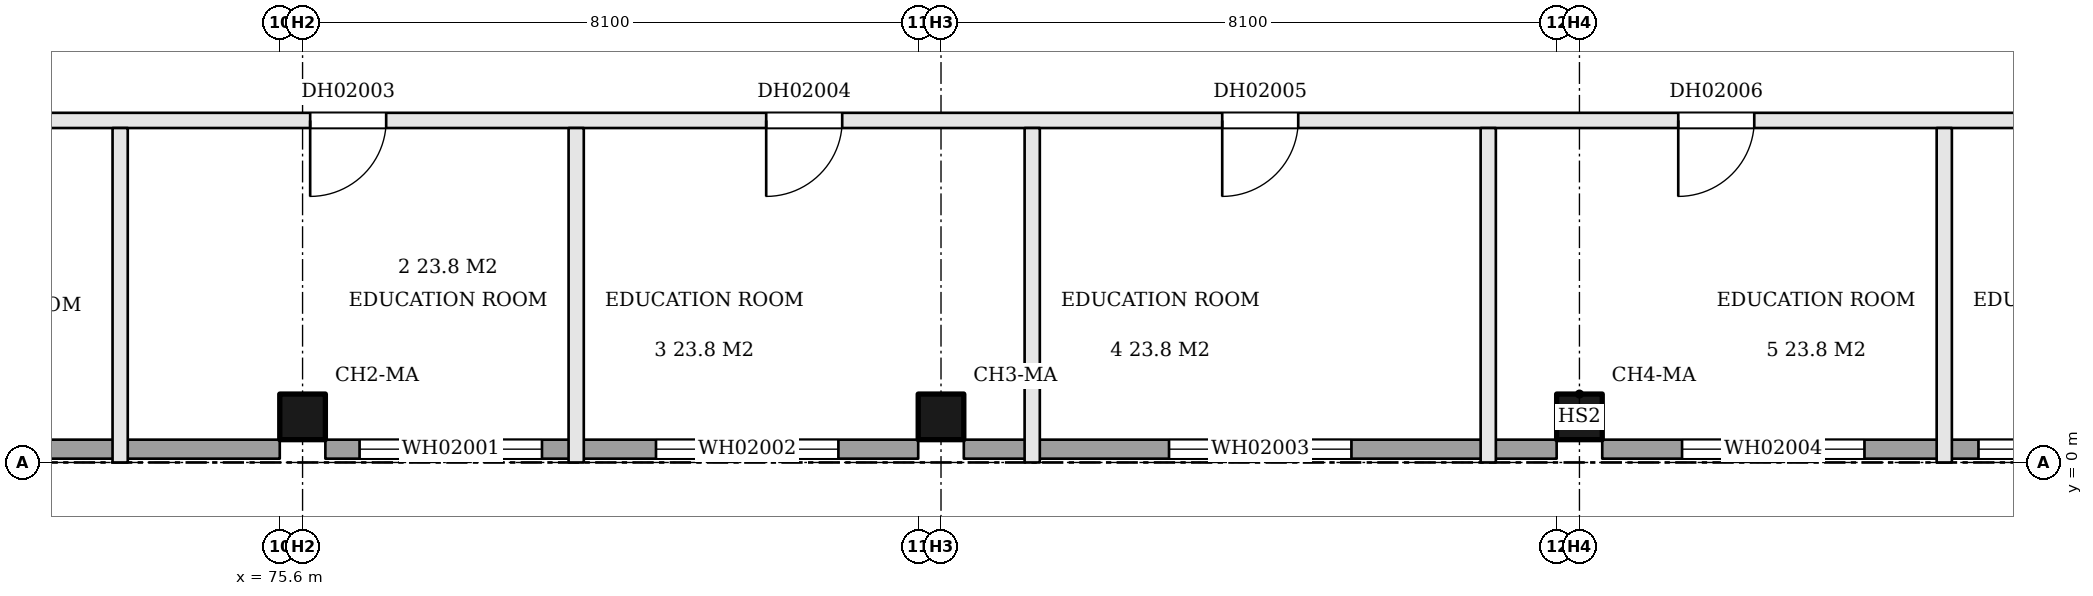
"""IFC4 building model, lengths in metres.
Left out: names, types, materials, properties, quantities, classifications, styles, units other than length and angle.
Written with IfcOpenShell. Run it as: python <this file> out.ifc"""

import sys

from ifc_helpers import new_model, si_unit, direction, frame, frame_2d, origin, origin_2d, place, context, subcontext, project, spatial, rectangle, extrude, element, fill, save


model = new_model("IFC4")
c1 = context("Model", 3, precision=1e-05, world=origin(), true_north=direction((0.0, 1.0)))
c2 = subcontext(c1, "Body", "Model", "MODEL_VIEW")
j1 = project(units=[si_unit("LENGTHUNIT", "METRE"), si_unit("PLANEANGLEUNIT", "RADIAN")], contexts=[c1])
p1 = place(None, origin())
s1 = spatial("IfcSite", under=j1, at=p1, CompositionType="ELEMENT")
p2 = place(p1, origin())
s2 = spatial("IfcBuilding", under=s1, at=p2, CompositionType="ELEMENT")
p3 = place(p2, frame((0.0, 0.0, 14.4)))
s3 = spatial("IfcBuildingStorey", under=s2, at=p3, CompositionType="ELEMENT", Elevation=14.4)
for number, where, z_axis, x_axis in (
    (1, (75.9, 0.6, 0.0), (0.0, 0.0, 1.0), (1.0, 0.0, 0.0)),
    (2, (84.3, 0.6, 0.0), (0.0, 0.0, 1.0), (1.0, 0.0, 0.0)),
    (3, (92.7, 0.6, 0.0), (0.0, 0.0, 1.0), (1.0, 0.0, 0.0)),
):
    element("IfcColumn", number, at=place(p3, frame(where, z_axis=z_axis, x_axis=x_axis)), inside=s3, PredefinedType="COLUMN", context=c2, shape_type="SweptSolid", body=[
        extrude(rectangle(XDim=0.6, YDim=0.6, at=origin_2d()), origin(), (0.0, 0.0, 1.0), 5.1),
    ])
p4 = place(p3, frame((68.4, 0.175, 0.0), z_axis=(0.0, 0.0, 1.0), x_axis=(1.0, 0.0, 0.0)))
e4 = element("IfcWall", 4, at=p4, inside=s3, PredefinedType="SOLIDWALL", context=c2, shape_type="SweptSolid", body=[
    extrude(rectangle(XDim=7.2, YDim=0.25, at=frame_2d((3.6, 0.0))), origin(), (0.0, 0.0, 1.0), 5.1),
])
p5 = place(p3, frame((76.2, 0.175, 0.0), z_axis=(0.0, 0.0, 1.0), x_axis=(1.0, 0.0, 0.0)))
e5 = element("IfcWall", 5, at=p5, inside=s3, PredefinedType="SOLIDWALL", context=c2, shape_type="SweptSolid", body=[
    extrude(rectangle(XDim=7.8, YDim=0.25, at=frame_2d((3.9, 0.0))), origin(), (0.0, 0.0, 1.0), 5.1),
])
p6 = place(p5, frame((0.45, 0.0, 0.9)))
e6 = element("IfcOpeningElement", 6, at=p6, cuts=e5, PredefinedType="OPENING", context=c2, shape_type="SweptSolid", body=[
    extrude(rectangle(XDim=2.4, YDim=1.5, at=frame_2d((1.2, 0.75))), frame((0.0, 0.135, 0.0), z_axis=(0.0, -1.0, 0.0), x_axis=(1.0, 0.0, 0.0)), (0.0, 0.0, 1.0), 0.27),
])
p7 = place(p5, frame((4.35, 0.0, 0.9)))
e7 = element("IfcOpeningElement", 7, at=p7, cuts=e5, PredefinedType="OPENING", context=c2, shape_type="SweptSolid", body=[
    extrude(rectangle(XDim=2.4, YDim=1.5, at=frame_2d((1.2, 0.75))), frame((0.0, 0.135, 0.0), z_axis=(0.0, -1.0, 0.0), x_axis=(1.0, 0.0, 0.0)), (0.0, 0.0, 1.0), 0.27),
])
p8 = place(p3, frame((84.6, 0.175, 0.0), z_axis=(0.0, 0.0, 1.0), x_axis=(1.0, 0.0, 0.0)))
e8 = element("IfcWall", 8, at=p8, inside=s3, PredefinedType="SOLIDWALL", context=c2, shape_type="SweptSolid", body=[
    extrude(rectangle(XDim=7.8, YDim=0.25, at=frame_2d((3.9, 0.0))), origin(), (0.0, 0.0, 1.0), 5.1),
])
p9 = place(p8, frame((2.7, 0.0, 0.9)))
e9 = element("IfcOpeningElement", 9, at=p9, cuts=e8, PredefinedType="OPENING", context=c2, shape_type="SweptSolid", body=[
    extrude(rectangle(XDim=2.4, YDim=1.5, at=frame_2d((1.2, 0.75))), frame((0.0, 0.135, 0.0), z_axis=(0.0, -1.0, 0.0), x_axis=(1.0, 0.0, 0.0)), (0.0, 0.0, 1.0), 0.27),
])
p10 = place(p3, frame((93.0, 0.175, 0.0), z_axis=(0.0, 0.0, 1.0), x_axis=(1.0, 0.0, 0.0)))
e10 = element("IfcWall", 10, at=p10, inside=s3, PredefinedType="SOLIDWALL", context=c2, shape_type="SweptSolid", body=[
    extrude(rectangle(XDim=7.8, YDim=0.25, at=frame_2d((3.9, 0.0))), origin(), (0.0, 0.0, 1.0), 5.1),
])
p11 = place(p10, frame((1.05, 0.0, 0.9)))
e11 = element("IfcOpeningElement", 11, at=p11, cuts=e10, PredefinedType="OPENING", context=c2, shape_type="SweptSolid", body=[
    extrude(rectangle(XDim=2.4, YDim=1.5, at=frame_2d((1.2, 0.75))), frame((0.0, 0.135, 0.0), z_axis=(0.0, -1.0, 0.0), x_axis=(1.0, 0.0, 0.0)), (0.0, 0.0, 1.0), 0.27),
])
p12 = place(p10, frame((4.95, 0.0, 0.9)))
e12 = element("IfcOpeningElement", 12, at=p12, cuts=e10, PredefinedType="OPENING", context=c2, shape_type="SweptSolid", body=[
    extrude(rectangle(XDim=2.4, YDim=1.5, at=frame_2d((1.2, 0.75))), frame((0.0, 0.135, 0.0), z_axis=(0.0, -1.0, 0.0), x_axis=(1.0, 0.0, 0.0)), (0.0, 0.0, 1.0), 0.27),
])
p13 = place(p3, frame((68.4, 4.5, 0.0), z_axis=(0.0, 0.0, 1.0), x_axis=(1.0, 0.0, 0.0)))
e13 = element("IfcWall", 13, at=p13, inside=s3, PredefinedType="PARTITIONING", context=c2, shape_type="SweptSolid", body=[
    extrude(rectangle(XDim=40.975, YDim=0.2, at=frame_2d((20.488, 0.0))), origin(), (0.0, 0.0, 1.0), 5.1),
])
p14 = place(p13, frame((1.6, 0.0, 0.0)))
e14 = element("IfcOpeningElement", 14, at=p14, cuts=e13, PredefinedType="OPENING", context=c2, shape_type="SweptSolid", body=[
    extrude(rectangle(XDim=1.0, YDim=2.1, at=frame_2d((0.5, 1.05))), frame((0.0, 0.11, 0.0), z_axis=(0.0, -1.0, 0.0), x_axis=(1.0, 0.0, 0.0)), (0.0, 0.0, 1.0), 0.22),
])
p15 = place(p13, frame((7.6, 0.0, 0.0)))
e15 = element("IfcOpeningElement", 15, at=p15, cuts=e13, PredefinedType="OPENING", context=c2, shape_type="SweptSolid", body=[
    extrude(rectangle(XDim=1.0, YDim=2.1, at=frame_2d((0.5, 1.05))), frame((0.0, 0.11, 0.0), z_axis=(0.0, -1.0, 0.0), x_axis=(1.0, 0.0, 0.0)), (0.0, 0.0, 1.0), 0.22),
])
p16 = place(p13, frame((13.6, 0.0, 0.0)))
e16 = element("IfcOpeningElement", 16, at=p16, cuts=e13, PredefinedType="OPENING", context=c2, shape_type="SweptSolid", body=[
    extrude(rectangle(XDim=1.0, YDim=2.1, at=frame_2d((0.5, 1.05))), frame((0.0, 0.11, 0.0), z_axis=(0.0, -1.0, 0.0), x_axis=(1.0, 0.0, 0.0)), (0.0, 0.0, 1.0), 0.22),
])
p17 = place(p13, frame((19.6, 0.0, 0.0)))
e17 = element("IfcOpeningElement", 17, at=p17, cuts=e13, PredefinedType="OPENING", context=c2, shape_type="SweptSolid", body=[
    extrude(rectangle(XDim=1.0, YDim=2.1, at=frame_2d((0.5, 1.05))), frame((0.0, 0.11, 0.0), z_axis=(0.0, -1.0, 0.0), x_axis=(1.0, 0.0, 0.0)), (0.0, 0.0, 1.0), 0.22),
])
p18 = place(p13, frame((25.6, 0.0, 0.0)))
e18 = element("IfcOpeningElement", 18, at=p18, cuts=e13, PredefinedType="OPENING", context=c2, shape_type="SweptSolid", body=[
    extrude(rectangle(XDim=1.0, YDim=2.1, at=frame_2d((0.5, 1.05))), frame((0.0, 0.11, 0.0), z_axis=(0.0, -1.0, 0.0), x_axis=(1.0, 0.0, 0.0)), (0.0, 0.0, 1.0), 0.22),
])
p19 = place(p13, frame((31.6, 0.0, 0.0)))
e19 = element("IfcOpeningElement", 19, at=p19, cuts=e13, PredefinedType="OPENING", context=c2, shape_type="SweptSolid", body=[
    extrude(rectangle(XDim=1.0, YDim=2.1, at=frame_2d((0.5, 1.05))), frame((0.0, 0.11, 0.0), z_axis=(0.0, -1.0, 0.0), x_axis=(1.0, 0.0, 0.0)), (0.0, 0.0, 1.0), 0.22),
])
p20 = place(p13, frame((37.6, 0.0, 0.0)))
e20 = element("IfcOpeningElement", 20, at=p20, cuts=e13, PredefinedType="OPENING", context=c2, shape_type="SweptSolid", body=[
    extrude(rectangle(XDim=1.0, YDim=2.1, at=frame_2d((0.5, 1.05))), frame((0.0, 0.11, 0.0), z_axis=(0.0, -1.0, 0.0), x_axis=(1.0, 0.0, 0.0)), (0.0, 0.0, 1.0), 0.22),
])
for number, where, z_axis, x_axis in (
    (21, (73.5, 0.0, 0.0), (0.0, 0.0, 1.0), (0.0, 1.0, 0.0)),
    (22, (79.5, 0.0, 0.0), (0.0, 0.0, 1.0), (0.0, 1.0, 0.0)),
    (23, (85.5, 0.0, 0.0), (0.0, 0.0, 1.0), (0.0, 1.0, 0.0)),
    (24, (91.5, 0.0, 0.0), (0.0, 0.0, 1.0), (0.0, 1.0, 0.0)),
    (25, (97.5, 0.0, 0.0), (0.0, 0.0, 1.0), (0.0, 1.0, 0.0)),
):
    element("IfcWall", number, at=place(p3, frame(where, z_axis=z_axis, x_axis=x_axis)), inside=s3, PredefinedType="PARTITIONING", context=c2, shape_type="SweptSolid", body=[
        extrude(rectangle(XDim=4.4, YDim=0.2, at=frame_2d((2.2, 0.0))), origin(), (0.0, 0.0, 1.0), 5.1),
    ])
p21 = place(p15, frame((1.0, 0.0, 0.0), z_axis=(0.0, 0.0, 1.0), x_axis=(-1.0, 0.0, 0.0)))
e26 = element("IfcDoor", 26, at=p21, inside=s3, OperationType="SINGLE_SWING_RIGHT", PredefinedType="DOOR", context=c2, shape_type="SweptSolid", body=[
    extrude(rectangle(XDim=1.0, YDim=2.1, at=frame_2d((0.5, 1.05))), frame((0.0, 0.025, 0.0), z_axis=(0.0, -1.0, 0.0), x_axis=(1.0, 0.0, 0.0)), (0.0, 0.0, 1.0), 0.05),
])
fill(e15, e26)
p22 = place(p16, frame((1.0, 0.0, 0.0), z_axis=(0.0, 0.0, 1.0), x_axis=(-1.0, 0.0, 0.0)))
e27 = element("IfcDoor", 27, at=p22, inside=s3, OperationType="SINGLE_SWING_RIGHT", PredefinedType="DOOR", context=c2, shape_type="SweptSolid", body=[
    extrude(rectangle(XDim=1.0, YDim=2.1, at=frame_2d((0.5, 1.05))), frame((0.0, 0.025, 0.0), z_axis=(0.0, -1.0, 0.0), x_axis=(1.0, 0.0, 0.0)), (0.0, 0.0, 1.0), 0.05),
])
fill(e16, e27)
p23 = place(p17, frame((1.0, 0.0, 0.0), z_axis=(0.0, 0.0, 1.0), x_axis=(-1.0, 0.0, 0.0)))
e28 = element("IfcDoor", 28, at=p23, inside=s3, OperationType="SINGLE_SWING_RIGHT", PredefinedType="DOOR", context=c2, shape_type="SweptSolid", body=[
    extrude(rectangle(XDim=1.0, YDim=2.1, at=frame_2d((0.5, 1.05))), frame((0.0, 0.025, 0.0), z_axis=(0.0, -1.0, 0.0), x_axis=(1.0, 0.0, 0.0)), (0.0, 0.0, 1.0), 0.05),
])
fill(e17, e28)
p24 = place(p18, frame((1.0, 0.0, 0.0), z_axis=(0.0, 0.0, 1.0), x_axis=(-1.0, 0.0, 0.0)))
e29 = element("IfcDoor", 29, at=p24, inside=s3, OperationType="SINGLE_SWING_RIGHT", PredefinedType="DOOR", context=c2, shape_type="SweptSolid", body=[
    extrude(rectangle(XDim=1.0, YDim=2.1, at=frame_2d((0.5, 1.05))), frame((0.0, 0.025, 0.0), z_axis=(0.0, -1.0, 0.0), x_axis=(1.0, 0.0, 0.0)), (0.0, 0.0, 1.0), 0.05),
])
fill(e18, e29)
p25 = place(p6, origin())
e30 = element("IfcWindow", 30, at=p25, inside=s3, PartitioningType="DOUBLE_PANEL_VERTICAL", PredefinedType="WINDOW", context=c2, shape_type="SweptSolid", body=[
    extrude(rectangle(XDim=2.4, YDim=1.5, at=frame_2d((1.2, 0.75))), frame((0.0, 0.03, 0.0), z_axis=(0.0, -1.0, 0.0), x_axis=(1.0, 0.0, 0.0)), (0.0, 0.0, 1.0), 0.06),
])
fill(e6, e30)
p26 = place(p7, origin())
e31 = element("IfcWindow", 31, at=p26, inside=s3, PartitioningType="DOUBLE_PANEL_VERTICAL", PredefinedType="WINDOW", context=c2, shape_type="SweptSolid", body=[
    extrude(rectangle(XDim=2.4, YDim=1.5, at=frame_2d((1.2, 0.75))), frame((0.0, 0.03, 0.0), z_axis=(0.0, -1.0, 0.0), x_axis=(1.0, 0.0, 0.0)), (0.0, 0.0, 1.0), 0.06),
])
fill(e7, e31)
p27 = place(p9, origin())
e32 = element("IfcWindow", 32, at=p27, inside=s3, PartitioningType="DOUBLE_PANEL_VERTICAL", PredefinedType="WINDOW", context=c2, shape_type="SweptSolid", body=[
    extrude(rectangle(XDim=2.4, YDim=1.5, at=frame_2d((1.2, 0.75))), frame((0.0, 0.03, 0.0), z_axis=(0.0, -1.0, 0.0), x_axis=(1.0, 0.0, 0.0)), (0.0, 0.0, 1.0), 0.06),
])
fill(e9, e32)
p28 = place(p11, origin())
e33 = element("IfcWindow", 33, at=p28, inside=s3, PartitioningType="DOUBLE_PANEL_VERTICAL", PredefinedType="WINDOW", context=c2, shape_type="SweptSolid", body=[
    extrude(rectangle(XDim=2.4, YDim=1.5, at=frame_2d((1.2, 0.75))), frame((0.0, 0.03, 0.0), z_axis=(0.0, -1.0, 0.0), x_axis=(1.0, 0.0, 0.0)), (0.0, 0.0, 1.0), 0.06),
])
fill(e11, e33)
p29 = place(p12, origin())
e34 = element("IfcWindow", 34, at=p29, inside=s3, PartitioningType="DOUBLE_PANEL_VERTICAL", PredefinedType="WINDOW", context=c2, shape_type="SweptSolid", body=[
    extrude(rectangle(XDim=2.4, YDim=1.5, at=frame_2d((1.2, 0.75))), frame((0.0, 0.03, 0.0), z_axis=(0.0, -1.0, 0.0), x_axis=(1.0, 0.0, 0.0)), (0.0, 0.0, 1.0), 0.06),
])
fill(e12, e34)
save(model, sys.argv[1])
